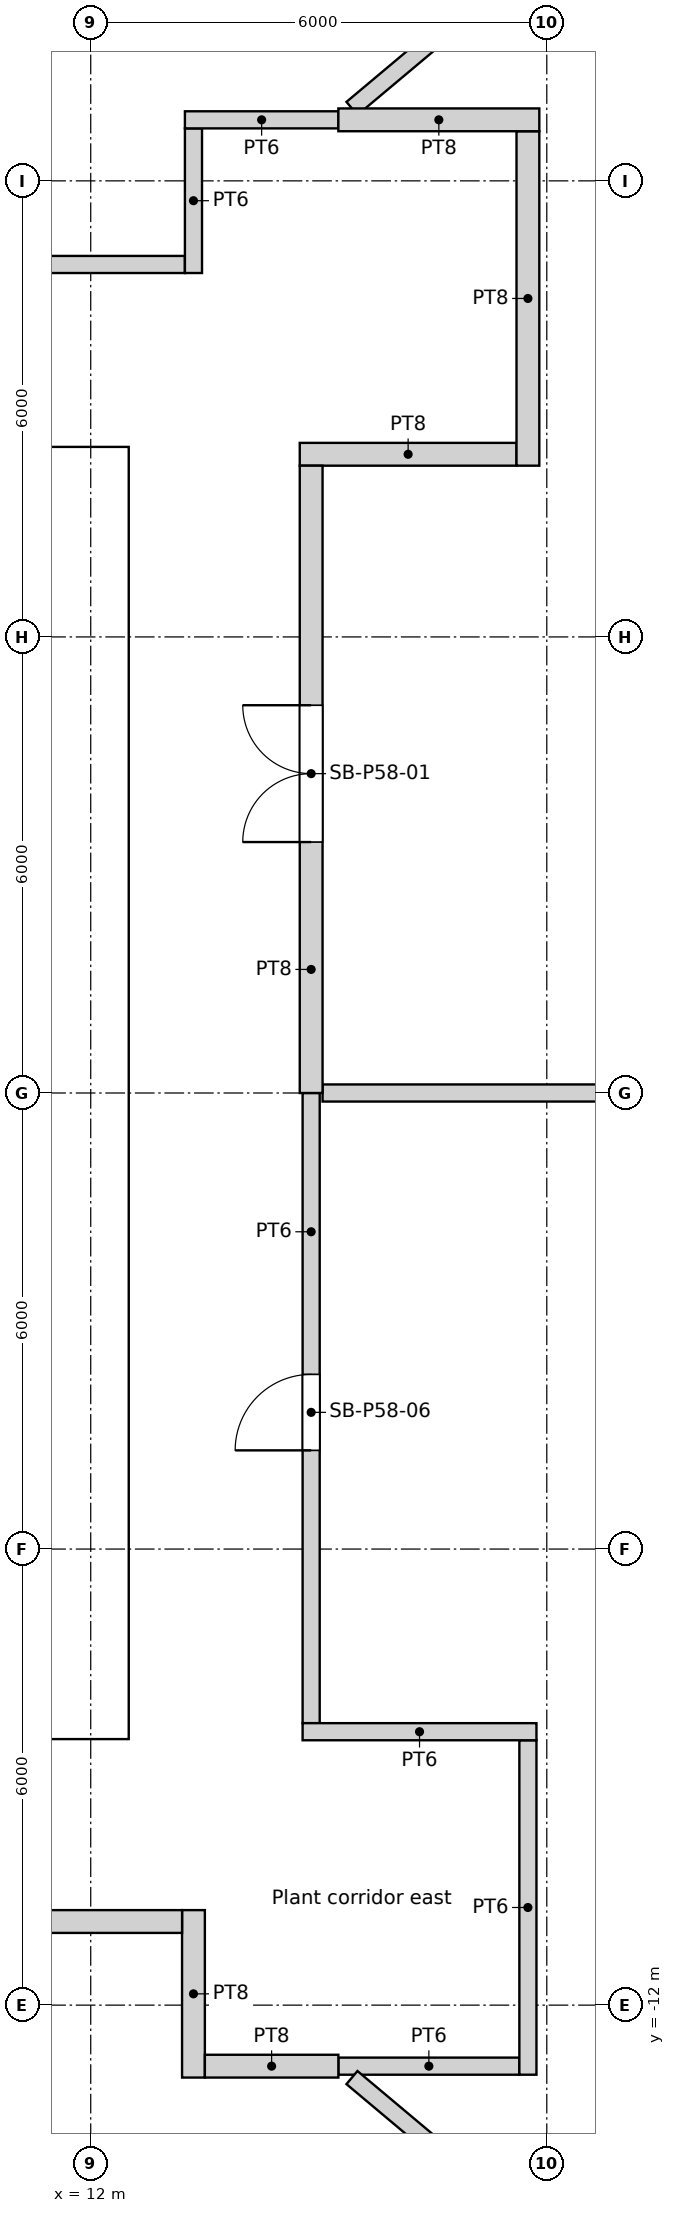
"""IFC4 building model, lengths in metres.
Left out: names, types, materials, properties, quantities, classifications, styles, units other than length and angle.
Written with IfcOpenShell. Run it as: python <this file> out.ifc"""

import sys

from ifc_helpers import new_model, si_unit, direction, frame, frame_2d, origin, origin_2d, place, context, subcontext, project, spatial, rectangle, circle, extrude, element, fill, save


model = new_model("IFC4")
c1 = context("Model", 3, precision=1e-05, world=origin(), true_north=direction((0.0, 1.0)))
c2 = subcontext(c1, "Body", "Model", "MODEL_VIEW")
j1 = project(units=[si_unit("LENGTHUNIT", "METRE"), si_unit("PLANEANGLEUNIT", "RADIAN")], contexts=[c1])
p1 = place(None, origin())
s1 = spatial("IfcSite", under=j1, at=p1, CompositionType="ELEMENT")
p2 = place(p1, origin())
s2 = spatial("IfcBuilding", under=s1, at=p2, CompositionType="ELEMENT")
p3 = place(p2, frame((0.0, 0.0, 225.0)))
s3 = spatial("IfcBuildingStorey", under=s2, at=p3, CompositionType="ELEMENT", Elevation=225.0)
for number, where, z_axis, x_axis in (
    (1, (18.822, 0.0, 0.0), (0.0, 0.0, 1.0), (1.0, 0.0, 0.0)),
    (2, (17.986, 5.548, 0.0), (0.0, 0.0, 1.0), (1.0, 0.0, 0.0)),
    (3, (15.552, 10.603, 0.0), (0.0, 0.0, 1.0), (1.0, 0.0, 0.0)),
    (4, (15.552, -10.603, 0.0), (0.0, 0.0, 1.0), (1.0, 0.0, 0.0)),
    (5, (17.986, -5.548, 0.0), (0.0, 0.0, 1.0), (1.0, 0.0, 0.0)),
):
    element("IfcColumn", number, at=place(p3, frame(where, z_axis=z_axis, x_axis=x_axis)), inside=s3, PredefinedType="COLUMN", context=c2, shape_type="SweptSolid", body=[
        extrude(circle(Radius=0.65, at=origin_2d()), origin(), (0.0, 0.0, 1.0), 6.0),
    ])
p4 = place(p3, frame((-12.5, -8.05, 0.0), z_axis=(0.0, 0.0, 1.0), x_axis=(1.0, 0.0, 0.0)))
e6 = element("IfcWall", 6, at=p4, inside=s3, PredefinedType="SOLIDWALL", context=c2, shape_type="SweptSolid", body=[
    extrude(rectangle(XDim=25.0, YDim=0.9, at=frame_2d((12.5, 0.0))), origin(), (0.0, 0.0, 1.0), 5.65),
])
p5 = place(p4, frame((13.4, 0.0, 0.0)))
e7 = element("IfcOpeningElement", 7, at=p5, cuts=e6, PredefinedType="OPENING", context=c2, shape_type="SweptSolid", body=[
    extrude(rectangle(XDim=1.0, YDim=2.1, at=frame_2d((0.5, 1.05))), frame((0.0, 0.45, 0.0), z_axis=(0.0, -1.0, 0.0), x_axis=(1.0, 0.0, 0.0)), (0.0, 0.0, 1.0), 0.9),
])
p6 = place(p4, frame((8.3, 0.0, 0.0)))
e8 = element("IfcOpeningElement", 8, at=p6, cuts=e6, PredefinedType="OPENING", context=c2, shape_type="SweptSolid", body=[
    extrude(rectangle(XDim=1.8, YDim=2.1, at=frame_2d((0.9, 1.05))), frame((0.0, 0.45, 0.0), z_axis=(0.0, -1.0, 0.0), x_axis=(1.0, 0.0, 0.0)), (0.0, 0.0, 1.0), 0.9),
])
p7 = place(p4, frame((14.9, 0.0, 0.0)))
e9 = element("IfcOpeningElement", 9, at=p7, cuts=e6, PredefinedType="OPENING", context=c2, shape_type="SweptSolid", body=[
    extrude(rectangle(XDim=1.8, YDim=2.1, at=frame_2d((0.9, 1.05))), frame((0.0, 0.45, 0.0), z_axis=(0.0, -1.0, 0.0), x_axis=(1.0, 0.0, 0.0)), (0.0, 0.0, 1.0), 0.9),
])
p8 = place(p3, frame((-12.5, 8.05, 0.0), z_axis=(0.0, 0.0, 1.0), x_axis=(1.0, 0.0, 0.0)))
e10 = element("IfcWall", 10, at=p8, inside=s3, PredefinedType="SOLIDWALL", context=c2, shape_type="SweptSolid", body=[
    extrude(rectangle(XDim=25.0, YDim=0.9, at=frame_2d((12.5, 0.0))), origin(), (0.0, 0.0, 1.0), 5.65),
])
p9 = place(p8, frame((8.3, 0.0, 0.0)))
e11 = element("IfcOpeningElement", 11, at=p9, cuts=e10, PredefinedType="OPENING", context=c2, shape_type="SweptSolid", body=[
    extrude(rectangle(XDim=1.8, YDim=2.1, at=frame_2d((0.9, 1.05))), frame((0.0, 0.45, 0.0), z_axis=(0.0, -1.0, 0.0), x_axis=(1.0, 0.0, 0.0)), (0.0, 0.0, 1.0), 0.9),
])
p10 = place(p3, frame((12.05, -7.6, 0.0), z_axis=(0.0, 0.0, 1.0), x_axis=(0.0, 1.0, 0.0)))
e12 = element("IfcWall", 12, at=p10, inside=s3, PredefinedType="SOLIDWALL", context=c2, shape_type="SweptSolid", body=[
    extrude(rectangle(XDim=15.2, YDim=0.9, at=frame_2d((7.6, 0.0))), origin(), (0.0, 0.0, 1.0), 5.65),
])
p11 = place(p10, frame((5.1, 0.0, 0.0)))
e13 = element("IfcOpeningElement", 13, at=p11, cuts=e12, PredefinedType="OPENING", context=c2, shape_type="SweptSolid", body=[
    extrude(rectangle(XDim=1.0, YDim=2.1, at=frame_2d((0.5, 1.05))), frame((0.0, 0.45, 0.0), z_axis=(0.0, -1.0, 0.0), x_axis=(1.0, 0.0, 0.0)), (0.0, 0.0, 1.0), 0.9),
])
p12 = place(p3, frame((9.2, -4.55, 0.0), z_axis=(0.0, 0.0, 1.0), x_axis=(1.0, 0.0, 0.0)))
e14 = element("IfcWall", 14, at=p12, inside=s3, PredefinedType="SOLIDWALL", context=c2, shape_type="SweptSolid", body=[
    extrude(rectangle(XDim=2.4, YDim=0.3, at=frame_2d((1.2, 0.0))), origin(), (0.0, 0.0, 1.0), 5.65),
])
p13 = place(p12, frame((0.6, 0.0, 0.0)))
e15 = element("IfcOpeningElement", 15, at=p13, cuts=e14, PredefinedType="OPENING", context=c2, shape_type="SweptSolid", body=[
    extrude(rectangle(XDim=1.2, YDim=2.1, at=frame_2d((0.6, 1.05))), frame((0.0, 0.15, 0.0), z_axis=(0.0, -1.0, 0.0), x_axis=(1.0, 0.0, 0.0)), (0.0, 0.0, 1.0), 0.3),
])
p14 = place(p3, frame((9.2, 4.55, 0.0), z_axis=(0.0, 0.0, 1.0), x_axis=(1.0, 0.0, 0.0)))
e16 = element("IfcWall", 16, at=p14, inside=s3, PredefinedType="SOLIDWALL", context=c2, shape_type="SweptSolid", body=[
    extrude(rectangle(XDim=2.4, YDim=0.3, at=frame_2d((1.2, 0.0))), origin(), (0.0, 0.0, 1.0), 5.65),
])
p15 = place(p14, frame((0.6, 0.0, 0.0)))
e17 = element("IfcOpeningElement", 17, at=p15, cuts=e16, PredefinedType="OPENING", context=c2, shape_type="SweptSolid", body=[
    extrude(rectangle(XDim=1.2, YDim=2.1, at=frame_2d((0.6, 1.05))), frame((0.0, 0.15, 0.0), z_axis=(0.0, -1.0, 0.0), x_axis=(1.0, 0.0, 0.0)), (0.0, 0.0, 1.0), 0.3),
])
p16 = place(p3, frame((3.84, -10.9, 0.0), z_axis=(0.0, 0.0, 1.0), x_axis=(1.0, 0.0, 0.0)))
e18 = element("IfcWall", 18, at=p16, inside=s3, PredefinedType="PARTITIONING", context=c2, shape_type="SweptSolid", body=[
    extrude(rectangle(XDim=9.361, YDim=0.3, at=frame_2d((4.681, 0.0))), origin(), (0.0, 0.0, 1.0), 5.2),
])
p17 = place(p16, frame((3.351, 0.0, 0.0)))
e19 = element("IfcOpeningElement", 19, at=p17, cuts=e18, PredefinedType="OPENING", context=c2, shape_type="SweptSolid", body=[
    extrude(rectangle(XDim=1.8, YDim=2.4, at=frame_2d((0.9, 1.2))), frame((0.0, 0.15, 0.0), z_axis=(0.0, -1.0, 0.0), x_axis=(1.0, 0.0, 0.0)), (0.0, 0.0, 1.0), 0.3),
])
p18 = place(p3, frame((13.502, -12.803, 0.0), z_axis=(0.0, 0.0, 1.0), x_axis=(1.0, 0.0, 0.0)))
e20 = element("IfcWall", 20, at=p18, inside=s3, PredefinedType="PARTITIONING", context=c2, shape_type="SweptSolid", body=[
    extrude(rectangle(XDim=1.756, YDim=0.3, at=frame_2d((0.878, 0.0))), origin(), (0.0, 0.0, 1.0), 5.2),
])
p19 = place(p3, frame((13.352, -10.75, 0.0), z_axis=(0.0, 0.0, 1.0), x_axis=(0.0, -1.0, 0.0)))
e21 = element("IfcWall", 21, at=p19, inside=s3, PredefinedType="PARTITIONING", context=c2, shape_type="SweptSolid", body=[
    extrude(rectangle(XDim=2.203, YDim=0.3, at=frame_2d((1.102, 0.0))), origin(), (0.0, 0.0, 1.0), 5.2),
])
p20 = place(p3, frame((13.239, 10.9, 0.0), z_axis=(0.0, 0.0, 1.0), x_axis=(-1.0, 0.0, 0.0)))
e22 = element("IfcWall", 22, at=p20, inside=s3, PredefinedType="PARTITIONING", context=c2, shape_type="SweptSolid", body=[
    extrude(rectangle(XDim=16.228, YDim=0.225, at=frame_2d((8.114, 0.0))), origin(), (0.0, 0.0, 1.0), 5.2),
])
p21 = place(p20, frame((3.738, 0.0, 0.0)))
e23 = element("IfcOpeningElement", 23, at=p21, cuts=e22, PredefinedType="OPENING", context=c2, shape_type="SweptSolid", body=[
    extrude(rectangle(XDim=1.8, YDim=2.4, at=frame_2d((0.9, 1.2))), frame((0.0, 0.113, 0.0), z_axis=(0.0, -1.0, 0.0), x_axis=(1.0, 0.0, 0.0)), (0.0, 0.0, 1.0), 0.225),
])
p22 = place(p20, frame((10.706, 0.0, 0.0)))
e24 = element("IfcOpeningElement", 24, at=p22, cuts=e22, PredefinedType="OPENING", context=c2, shape_type="SweptSolid", body=[
    extrude(rectangle(XDim=1.0, YDim=2.1, at=frame_2d((0.5, 1.05))), frame((0.0, 0.113, 0.0), z_axis=(0.0, -1.0, 0.0), x_axis=(1.0, 0.0, 0.0)), (0.0, 0.0, 1.0), 0.225),
])
p23 = place(p20, frame((14.551, 0.0, 0.0)))
e25 = element("IfcOpeningElement", 25, at=p23, cuts=e22, PredefinedType="OPENING", context=c2, shape_type="SweptSolid", body=[
    extrude(rectangle(XDim=1.0, YDim=2.1, at=frame_2d((0.5, 1.05))), frame((0.0, 0.113, 0.0), z_axis=(0.0, -1.0, 0.0), x_axis=(1.0, 0.0, 0.0)), (0.0, 0.0, 1.0), 0.225),
])
p24 = place(p3, frame((13.352, 12.69, 0.0), z_axis=(0.0, 0.0, 1.0), x_axis=(0.0, -1.0, 0.0)))
e26 = element("IfcWall", 26, at=p24, inside=s3, PredefinedType="PARTITIONING", context=c2, shape_type="SweptSolid", body=[
    extrude(rectangle(XDim=1.903, YDim=0.225, at=frame_2d((0.951, 0.0))), origin(), (0.0, 0.0, 1.0), 5.2),
])
p25 = place(p3, frame((14.9, -8.29, 0.0), z_axis=(0.0, 0.0, 1.0), x_axis=(0.0, 1.0, 0.0)))
e27 = element("IfcWall", 27, at=p25, inside=s3, PredefinedType="PARTITIONING", context=c2, shape_type="SweptSolid", body=[
    extrude(rectangle(XDim=8.29, YDim=0.225, at=frame_2d((4.145, 0.0))), origin(), (0.0, 0.0, 1.0), 5.2),
])
p26 = place(p25, frame((3.589, 0.0, 0.0)))
e28 = element("IfcOpeningElement", 28, at=p26, cuts=e27, PredefinedType="OPENING", context=c2, shape_type="SweptSolid", body=[
    extrude(rectangle(XDim=1.0, YDim=2.1, at=frame_2d((0.5, 1.05))), frame((0.0, 0.113, 0.0), z_axis=(0.0, -1.0, 0.0), x_axis=(1.0, 0.0, 0.0)), (0.0, 0.0, 1.0), 0.225),
])
p27 = place(p3, frame((14.9, 0.0, 0.0), z_axis=(0.0, 0.0, 1.0), x_axis=(0.0, 1.0, 0.0)))
e29 = element("IfcWall", 29, at=p27, inside=s3, PredefinedType="PARTITIONING", context=c2, shape_type="SweptSolid", body=[
    extrude(rectangle(XDim=8.253, YDim=0.3, at=frame_2d((4.126, 0.0))), origin(), (0.0, 0.0, 1.0), 5.2),
])
p28 = place(p27, frame((3.302, 0.0, 0.0)))
e30 = element("IfcOpeningElement", 30, at=p28, cuts=e29, PredefinedType="OPENING", context=c2, shape_type="SweptSolid", body=[
    extrude(rectangle(XDim=1.8, YDim=2.4, at=frame_2d((0.9, 1.2))), frame((0.0, 0.15, 0.0), z_axis=(0.0, -1.0, 0.0), x_axis=(1.0, 0.0, 0.0)), (0.0, 0.0, 1.0), 0.3),
])
p29 = place(p3, frame((14.75, 8.403, 0.0), z_axis=(0.0, 0.0, 1.0), x_axis=(1.0, 0.0, 0.0)))
e31 = element("IfcWall", 31, at=p29, inside=s3, PredefinedType="PARTITIONING", context=c2, shape_type="SweptSolid", body=[
    extrude(rectangle(XDim=2.852, YDim=0.3, at=frame_2d((1.426, 0.0))), origin(), (0.0, 0.0, 1.0), 5.2),
])
p30 = place(p3, frame((15.258, -12.803, 0.0), z_axis=(0.0, 0.0, 1.0), x_axis=(1.0, 0.0, 0.0)))
e32 = element("IfcWall", 32, at=p30, inside=s3, PredefinedType="PARTITIONING", context=c2, shape_type="SweptSolid", body=[
    extrude(rectangle(XDim=2.381, YDim=0.225, at=frame_2d((1.191, 0.0))), origin(), (0.0, 0.0, 1.0), 5.2),
])
p31 = place(p3, frame((15.258, 12.803, 0.0), z_axis=(0.0, 0.0, 1.0), x_axis=(-1.0, 0.0, 0.0)))
e33 = element("IfcWall", 33, at=p31, inside=s3, PredefinedType="PARTITIONING", context=c2, shape_type="SweptSolid", body=[
    extrude(rectangle(XDim=2.019, YDim=0.225, at=frame_2d((1.009, 0.0))), origin(), (0.0, 0.0, 1.0), 5.2),
])
p32 = place(p3, frame((17.752, -12.915, 0.0), z_axis=(0.0, 0.0, 1.0), x_axis=(0.0, 1.0, 0.0)))
e34 = element("IfcWall", 34, at=p32, inside=s3, PredefinedType="PARTITIONING", context=c2, shape_type="SweptSolid", body=[
    extrude(rectangle(XDim=4.4, YDim=0.225, at=frame_2d((2.2, 0.0))), origin(), (0.0, 0.0, 1.0), 5.2),
])
p33 = place(p3, frame((17.864, -8.403, 0.0), z_axis=(0.0, 0.0, 1.0), x_axis=(-1.0, 0.0, 0.0)))
e35 = element("IfcWall", 35, at=p33, inside=s3, PredefinedType="PARTITIONING", context=c2, shape_type="SweptSolid", body=[
    extrude(rectangle(XDim=3.076, YDim=0.225, at=frame_2d((1.538, 0.0))), origin(), (0.0, 0.0, 1.0), 5.2),
])
p34 = place(p3, frame((17.752, 8.253, 0.0), z_axis=(0.0, 0.0, 1.0), x_axis=(0.0, 1.0, 0.0)))
e36 = element("IfcWall", 36, at=p34, inside=s3, PredefinedType="PARTITIONING", context=c2, shape_type="SweptSolid", body=[
    extrude(rectangle(XDim=4.4, YDim=0.3, at=frame_2d((2.2, 0.0))), origin(), (0.0, 0.0, 1.0), 5.2),
])
p35 = place(p3, frame((17.902, 12.803, 0.0), z_axis=(0.0, 0.0, 1.0), x_axis=(-1.0, 0.0, 0.0)))
e37 = element("IfcWall", 37, at=p35, inside=s3, PredefinedType="PARTITIONING", context=c2, shape_type="SweptSolid", body=[
    extrude(rectangle(XDim=2.644, YDim=0.3, at=frame_2d((1.322, 0.0))), origin(), (0.0, 0.0, 1.0), 5.2),
])
for number, where, z_axis, x_axis in (
    (38, (19.532, -16.389, 0.0), (0.0, 0.0, 1.0), (-0.766, 0.643, 0.0)),
    (39, (19.532, 16.389, 0.0), (0.0, 0.0, 1.0), (-0.766, -0.643, 0.0)),
):
    element("IfcWall", number, at=place(p3, frame(where, z_axis=z_axis, x_axis=x_axis)), inside=s3, PredefinedType="PARTITIONING", context=c2, shape_type="SweptSolid", body=[
        extrude(rectangle(XDim=5.346, YDim=0.225, at=frame_2d((2.673, 0.0))), origin(), (0.0, 0.0, 1.0), 2.7),
    ])
p36 = place(p3, frame((25.497, 0.0, 0.0), z_axis=(0.0, 0.0, 1.0), x_axis=(-1.0, 0.0, 0.0)))
e40 = element("IfcWall", 40, at=p36, inside=s3, PredefinedType="PARTITIONING", context=c2, shape_type="SweptSolid", body=[
    extrude(rectangle(XDim=10.447, YDim=0.225, at=frame_2d((5.224, 0.0))), origin(), (0.0, 0.0, 1.0), 2.7),
])
p37 = place(p11, origin())
e41 = element("IfcDoor", 41, at=p37, inside=s3, OperationType="DOUBLE_DOOR_SINGLE_SWING", PredefinedType="DOOR", context=c2, shape_type="SweptSolid", body=[
    extrude(rectangle(XDim=1.0, YDim=2.1, at=frame_2d((0.5, 1.05))), frame((0.0, 0.025, 0.0), z_axis=(0.0, -1.0, 0.0), x_axis=(1.0, 0.0, 0.0)), (0.0, 0.0, 1.0), 0.05),
])
fill(e13, e41)
p38 = place(p28, origin())
e42 = element("IfcDoor", 42, at=p38, inside=s3, OperationType="DOUBLE_DOOR_SINGLE_SWING", PredefinedType="DOOR", context=c2, shape_type="SweptSolid", body=[
    extrude(rectangle(XDim=1.8, YDim=2.4, at=frame_2d((0.9, 1.2))), frame((0.0, 0.025, 0.0), z_axis=(0.0, -1.0, 0.0), x_axis=(1.0, 0.0, 0.0)), (0.0, 0.0, 1.0), 0.05),
])
fill(e30, e42)
p39 = place(p26, origin())
e43 = element("IfcDoor", 43, at=p39, inside=s3, OperationType="SINGLE_SWING_LEFT", PredefinedType="DOOR", context=c2, shape_type="SweptSolid", body=[
    extrude(rectangle(XDim=1.0, YDim=2.1, at=frame_2d((0.5, 1.05))), frame((0.0, 0.025, 0.0), z_axis=(0.0, -1.0, 0.0), x_axis=(1.0, 0.0, 0.0)), (0.0, 0.0, 1.0), 0.05),
])
fill(e28, e43)
save(model, sys.argv[1])
